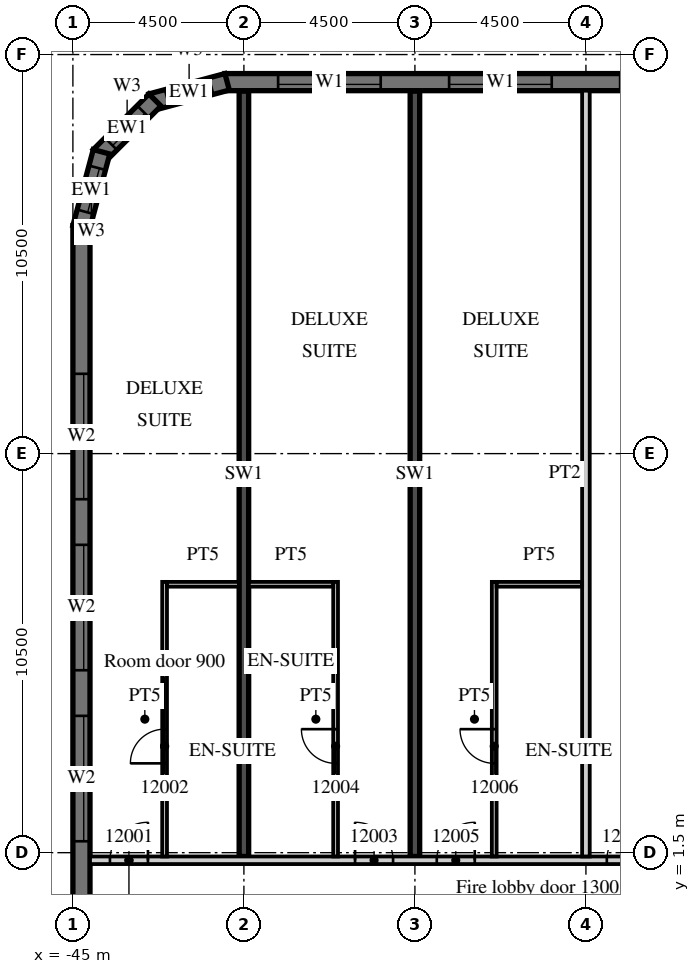
"""IFC4 building model, lengths in metres.
Left out: names, types, materials, properties, quantities, classifications, styles, units other than length and angle.
Written with IfcOpenShell. Run it as: python <this file> out.ifc"""

import sys

from ifc_helpers import new_model, si_unit, direction, frame, frame_2d, origin, place, context, subcontext, project, spatial, polyline, rectangle, outline, extrude, element, fill, save


model = new_model("IFC4")
c1 = context("Model", 3, precision=1e-05, world=origin(), true_north=direction((0.0, 1.0)))
c2 = subcontext(c1, "Body", "Model", "MODEL_VIEW")
j1 = project(units=[si_unit("LENGTHUNIT", "METRE"), si_unit("PLANEANGLEUNIT", "RADIAN")], contexts=[c1])
p1 = place(None, origin())
s1 = spatial("IfcSite", under=j1, at=p1, CompositionType="ELEMENT")
p2 = place(p1, origin())
s2 = spatial("IfcBuilding", under=s1, at=p2, CompositionType="ELEMENT")
p3 = place(p2, frame((0.0, 0.0, 69.9)))
s3 = spatial("IfcBuildingStorey", under=s2, at=p3, CompositionType="ELEMENT", Elevation=69.9)
for number, where, z_axis, x_axis in (
    (1, (-40.5, 1.4, 0.0), (0.0, 0.0, 1.0), (0.0, 1.0, 0.0)),
    (2, (-36.0, 1.4, 0.0), (0.0, 0.0, 1.0), (0.0, 1.0, 0.0)),
):
    element("IfcWall", number, at=place(p3, frame(where, z_axis=z_axis, x_axis=x_axis)), inside=s3, PredefinedType="SHEAR", context=c2, shape_type="SweptSolid", body=[
        extrude(rectangle(XDim=20.14, YDim=0.25, at=frame_2d((10.07, 0.0))), origin(), (0.0, 0.0, 1.0), 3.3),
    ])
p4 = place(p3, frame((13.5, 21.775, 0.0), z_axis=(0.0, 0.0, 1.0), x_axis=(-1.0, 0.0, 0.0)))
e3 = element("IfcWall", 3, at=p4, inside=s3, PredefinedType="SOLIDWALL", context=c2, shape_type="SweptSolid", body=[
    extrude(rectangle(XDim=54.5, YDim=0.45, at=frame_2d((27.25, 0.0))), origin(), (0.0, 0.0, 1.0), 3.02),
])
p5 = place(p4, frame((0.9, 0.0, 0.45)))
e4 = element("IfcOpeningElement", 4, at=p5, cuts=e3, PredefinedType="OPENING", context=c2, shape_type="SweptSolid", body=[
    extrude(rectangle(XDim=2.7, YDim=2.25, at=frame_2d((1.35, 1.125))), frame((0.0, 0.235, 0.0), z_axis=(0.0, -1.0, 0.0), x_axis=(1.0, 0.0, 0.0)), (0.0, 0.0, 1.0), 0.47),
])
p6 = place(p4, frame((5.4, 0.0, 0.45)))
e5 = element("IfcOpeningElement", 5, at=p6, cuts=e3, PredefinedType="OPENING", context=c2, shape_type="SweptSolid", body=[
    extrude(rectangle(XDim=2.7, YDim=2.25, at=frame_2d((1.35, 1.125))), frame((0.0, 0.235, 0.0), z_axis=(0.0, -1.0, 0.0), x_axis=(1.0, 0.0, 0.0)), (0.0, 0.0, 1.0), 0.47),
])
p7 = place(p4, frame((9.9, 0.0, 0.45)))
e6 = element("IfcOpeningElement", 6, at=p7, cuts=e3, PredefinedType="OPENING", context=c2, shape_type="SweptSolid", body=[
    extrude(rectangle(XDim=2.7, YDim=2.25, at=frame_2d((1.35, 1.125))), frame((0.0, 0.235, 0.0), z_axis=(0.0, -1.0, 0.0), x_axis=(1.0, 0.0, 0.0)), (0.0, 0.0, 1.0), 0.47),
])
p8 = place(p4, frame((14.4, 0.0, 0.45)))
e7 = element("IfcOpeningElement", 7, at=p8, cuts=e3, PredefinedType="OPENING", context=c2, shape_type="SweptSolid", body=[
    extrude(rectangle(XDim=2.7, YDim=2.25, at=frame_2d((1.35, 1.125))), frame((0.0, 0.235, 0.0), z_axis=(0.0, -1.0, 0.0), x_axis=(1.0, 0.0, 0.0)), (0.0, 0.0, 1.0), 0.47),
])
p9 = place(p4, frame((18.9, 0.0, 0.45)))
e8 = element("IfcOpeningElement", 8, at=p9, cuts=e3, PredefinedType="OPENING", context=c2, shape_type="SweptSolid", body=[
    extrude(rectangle(XDim=2.7, YDim=2.25, at=frame_2d((1.35, 1.125))), frame((0.0, 0.235, 0.0), z_axis=(0.0, -1.0, 0.0), x_axis=(1.0, 0.0, 0.0)), (0.0, 0.0, 1.0), 0.47),
])
p10 = place(p4, frame((23.4, 0.0, 0.45)))
e9 = element("IfcOpeningElement", 9, at=p10, cuts=e3, PredefinedType="OPENING", context=c2, shape_type="SweptSolid", body=[
    extrude(rectangle(XDim=2.7, YDim=2.25, at=frame_2d((1.35, 1.125))), frame((0.0, 0.235, 0.0), z_axis=(0.0, -1.0, 0.0), x_axis=(1.0, 0.0, 0.0)), (0.0, 0.0, 1.0), 0.47),
])
p11 = place(p4, frame((27.9, 0.0, 0.45)))
e10 = element("IfcOpeningElement", 10, at=p11, cuts=e3, PredefinedType="OPENING", context=c2, shape_type="SweptSolid", body=[
    extrude(rectangle(XDim=2.7, YDim=2.25, at=frame_2d((1.35, 1.125))), frame((0.0, 0.235, 0.0), z_axis=(0.0, -1.0, 0.0), x_axis=(1.0, 0.0, 0.0)), (0.0, 0.0, 1.0), 0.47),
])
p12 = place(p4, frame((32.4, 0.0, 0.45)))
e11 = element("IfcOpeningElement", 11, at=p12, cuts=e3, PredefinedType="OPENING", context=c2, shape_type="SweptSolid", body=[
    extrude(rectangle(XDim=2.7, YDim=2.25, at=frame_2d((1.35, 1.125))), frame((0.0, 0.235, 0.0), z_axis=(0.0, -1.0, 0.0), x_axis=(1.0, 0.0, 0.0)), (0.0, 0.0, 1.0), 0.47),
])
p13 = place(p4, frame((36.9, 0.0, 0.45)))
e12 = element("IfcOpeningElement", 12, at=p13, cuts=e3, PredefinedType="OPENING", context=c2, shape_type="SweptSolid", body=[
    extrude(rectangle(XDim=2.7, YDim=2.25, at=frame_2d((1.35, 1.125))), frame((0.0, 0.235, 0.0), z_axis=(0.0, -1.0, 0.0), x_axis=(1.0, 0.0, 0.0)), (0.0, 0.0, 1.0), 0.47),
])
p14 = place(p4, frame((41.4, 0.0, 0.45)))
e13 = element("IfcOpeningElement", 13, at=p14, cuts=e3, PredefinedType="OPENING", context=c2, shape_type="SweptSolid", body=[
    extrude(rectangle(XDim=2.7, YDim=2.25, at=frame_2d((1.35, 1.125))), frame((0.0, 0.235, 0.0), z_axis=(0.0, -1.0, 0.0), x_axis=(1.0, 0.0, 0.0)), (0.0, 0.0, 1.0), 0.47),
])
p15 = place(p4, frame((45.9, 0.0, 0.45)))
e14 = element("IfcOpeningElement", 14, at=p15, cuts=e3, PredefinedType="OPENING", context=c2, shape_type="SweptSolid", body=[
    extrude(rectangle(XDim=2.7, YDim=2.25, at=frame_2d((1.35, 1.125))), frame((0.0, 0.235, 0.0), z_axis=(0.0, -1.0, 0.0), x_axis=(1.0, 0.0, 0.0)), (0.0, 0.0, 1.0), 0.47),
])
p16 = place(p4, frame((50.4, 0.0, 0.45)))
e15 = element("IfcOpeningElement", 15, at=p16, cuts=e3, PredefinedType="OPENING", context=c2, shape_type="SweptSolid", body=[
    extrude(rectangle(XDim=2.7, YDim=2.25, at=frame_2d((1.35, 1.125))), frame((0.0, 0.235, 0.0), z_axis=(0.0, -1.0, 0.0), x_axis=(1.0, 0.0, 0.0)), (0.0, 0.0, 1.0), 0.47),
])
p17 = place(p3, frame((-40.942, 21.783, 0.0), z_axis=(0.0, 0.0, 1.0), x_axis=(-0.965926999034, -0.25881466832, 0.0)))
e16 = element("IfcWall", 16, at=p17, inside=s3, PredefinedType="SOLIDWALL", context=c2, shape_type="SweptSolid", body=[
    extrude(outline(polyline([(0.0, -0.225), (2.071, -0.225), (1.95, 0.225), (0.121, 0.225), (0.0, -0.225)])), origin(), (0.0, 0.0, 1.0), 3.02),
])
p18 = place(p17, frame((0.435, 0.0, 0.45)))
e17 = element("IfcOpeningElement", 17, at=p18, cuts=e16, PredefinedType="OPENING", context=c2, shape_type="SweptSolid", body=[
    extrude(rectangle(XDim=1.2, YDim=2.25, at=frame_2d((0.6, 1.125))), frame((0.0, 0.235, 0.0), z_axis=(0.0, -1.0, 0.0), x_axis=(1.0, 0.0, 0.0)), (0.0, 0.0, 1.0), 0.47),
])
p19 = place(p3, frame((-42.841, 21.305, 0.0), z_axis=(0.0, 0.0, 1.0), x_axis=(-0.707106781187, -0.707106781187, 0.0)))
e18 = element("IfcWall", 18, at=p19, inside=s3, PredefinedType="SOLIDWALL", context=c2, shape_type="SweptSolid", body=[
    extrude(outline(polyline([(0.0, -0.225), (2.071, -0.225), (1.95, 0.225), (0.121, 0.225), (0.0, -0.225)])), origin(), (0.0, 0.0, 1.0), 3.02),
])
p20 = place(p19, frame((0.435, 0.0, 0.45)))
e19 = element("IfcOpeningElement", 19, at=p20, cuts=e18, PredefinedType="OPENING", context=c2, shape_type="SweptSolid", body=[
    extrude(rectangle(XDim=1.2, YDim=2.25, at=frame_2d((0.6, 1.125))), frame((0.0, 0.235, 0.0), z_axis=(0.0, -1.0, 0.0), x_axis=(1.0, 0.0, 0.0)), (0.0, 0.0, 1.0), 0.47),
])
p21 = place(p3, frame((-44.247, 19.942, 0.0), z_axis=(0.0, 0.0, 1.0), x_axis=(-0.25881466832, -0.965926999034, 0.0)))
e20 = element("IfcWall", 20, at=p21, inside=s3, PredefinedType="SOLIDWALL", context=c2, shape_type="SweptSolid", body=[
    extrude(outline(polyline([(-0.0, -0.225), (2.07, -0.225), (1.95, 0.225), (0.12, 0.225), (-0.0, -0.225)])), origin(), (0.0, 0.0, 1.0), 3.02),
])
p22 = place(p21, frame((0.435, 0.0, 0.45)))
e21 = element("IfcOpeningElement", 21, at=p22, cuts=e20, PredefinedType="OPENING", context=c2, shape_type="SweptSolid", body=[
    extrude(rectangle(XDim=1.2, YDim=2.25, at=frame_2d((0.6, 1.125))), frame((0.0, 0.235, 0.0), z_axis=(0.0, -1.0, 0.0), x_axis=(1.0, 0.0, 0.0)), (0.0, 0.0, 1.0), 0.47),
])
p23 = place(p3, frame((-44.775, 18.0, 0.0), z_axis=(0.0, 0.0, 1.0), x_axis=(0.0, -1.0, 0.0)))
e22 = element("IfcWall", 22, at=p23, inside=s3, PredefinedType="SOLIDWALL", context=c2, shape_type="SweptSolid", body=[
    extrude(rectangle(XDim=36.0, YDim=0.45, at=frame_2d((18.0, 0.0))), origin(), (0.0, 0.0, 1.0), 3.02),
])
p24 = place(p23, frame((3.9, 0.0, 0.45)))
e23 = element("IfcOpeningElement", 23, at=p24, cuts=e22, PredefinedType="OPENING", context=c2, shape_type="SweptSolid", body=[
    extrude(rectangle(XDim=3.3, YDim=2.25, at=frame_2d((1.65, 1.125))), frame((0.0, 0.235, 0.0), z_axis=(0.0, -1.0, 0.0), x_axis=(1.0, 0.0, 0.0)), (0.0, 0.0, 1.0), 0.47),
])
p25 = place(p23, frame((8.4, 0.0, 0.45)))
e24 = element("IfcOpeningElement", 24, at=p25, cuts=e22, PredefinedType="OPENING", context=c2, shape_type="SweptSolid", body=[
    extrude(rectangle(XDim=3.3, YDim=2.25, at=frame_2d((1.65, 1.125))), frame((0.0, 0.235, 0.0), z_axis=(0.0, -1.0, 0.0), x_axis=(1.0, 0.0, 0.0)), (0.0, 0.0, 1.0), 0.47),
])
p26 = place(p23, frame((12.9, 0.0, 0.45)))
e25 = element("IfcOpeningElement", 25, at=p26, cuts=e22, PredefinedType="OPENING", context=c2, shape_type="SweptSolid", body=[
    extrude(rectangle(XDim=3.3, YDim=2.25, at=frame_2d((1.65, 1.125))), frame((0.0, 0.235, 0.0), z_axis=(0.0, -1.0, 0.0), x_axis=(1.0, 0.0, 0.0)), (0.0, 0.0, 1.0), 0.47),
])
p27 = place(p3, frame((-44.55, 1.3, 0.0), z_axis=(0.0, 0.0, 1.0), x_axis=(1.0, 0.0, 0.0)))
e26 = element("IfcWall", 26, at=p27, inside=s3, PredefinedType="PARTITIONING", context=c2, shape_type="SweptSolid", body=[
    extrude(rectangle(XDim=58.05, YDim=0.2, at=frame_2d((29.025, 0.0))), origin(), (0.0, 0.0, 1.0), 3.02),
])
p28 = place(p27, frame((0.525, 0.0, 0.0)))
e27 = element("IfcOpeningElement", 27, at=p28, cuts=e26, PredefinedType="OPENING", context=c2, shape_type="SweptSolid", body=[
    extrude(rectangle(XDim=1.0, YDim=2.1, at=frame_2d((0.5, 1.05))), frame((0.0, 0.11, 0.0), z_axis=(0.0, -1.0, 0.0), x_axis=(1.0, 0.0, 0.0)), (0.0, 0.0, 1.0), 0.22),
])
p29 = place(p27, frame((6.975, 0.0, 0.0)))
e28 = element("IfcOpeningElement", 28, at=p29, cuts=e26, PredefinedType="OPENING", context=c2, shape_type="SweptSolid", body=[
    extrude(rectangle(XDim=1.0, YDim=2.1, at=frame_2d((0.5, 1.05))), frame((0.0, 0.11, 0.0), z_axis=(0.0, -1.0, 0.0), x_axis=(1.0, 0.0, 0.0)), (0.0, 0.0, 1.0), 0.22),
])
p30 = place(p27, frame((9.125, 0.0, 0.0)))
e29 = element("IfcOpeningElement", 29, at=p30, cuts=e26, PredefinedType="OPENING", context=c2, shape_type="SweptSolid", body=[
    extrude(rectangle(XDim=1.0, YDim=2.1, at=frame_2d((0.5, 1.05))), frame((0.0, 0.11, 0.0), z_axis=(0.0, -1.0, 0.0), x_axis=(1.0, 0.0, 0.0)), (0.0, 0.0, 1.0), 0.22),
])
p31 = place(p27, frame((13.6, 0.0, 0.0)))
e30 = element("IfcOpeningElement", 30, at=p31, cuts=e26, PredefinedType="OPENING", context=c2, shape_type="SweptSolid", body=[
    extrude(rectangle(XDim=1.0, YDim=2.1, at=frame_2d((0.5, 1.05))), frame((0.0, 0.11, 0.0), z_axis=(0.0, -1.0, 0.0), x_axis=(1.0, 0.0, 0.0)), (0.0, 0.0, 1.0), 0.22),
])
p32 = place(p27, frame((19.987, 0.0, 0.0)))
e31 = element("IfcOpeningElement", 31, at=p32, cuts=e26, PredefinedType="OPENING", context=c2, shape_type="SweptSolid", body=[
    extrude(rectangle(XDim=1.2, YDim=2.1, at=frame_2d((0.6, 1.05))), frame((0.0, 0.11, 0.0), z_axis=(0.0, -1.0, 0.0), x_axis=(1.0, 0.0, 0.0)), (0.0, 0.0, 1.0), 0.22),
])
p33 = place(p27, frame((31.912, 0.0, 0.0)))
e32 = element("IfcOpeningElement", 32, at=p33, cuts=e26, PredefinedType="OPENING", context=c2, shape_type="SweptSolid", body=[
    extrude(rectangle(XDim=1.2, YDim=2.1, at=frame_2d((0.6, 1.05))), frame((0.0, 0.11, 0.0), z_axis=(0.0, -1.0, 0.0), x_axis=(1.0, 0.0, 0.0)), (0.0, 0.0, 1.0), 0.22),
])
p34 = place(p27, frame((38.5, 0.0, 0.0)))
e33 = element("IfcOpeningElement", 33, at=p34, cuts=e26, PredefinedType="OPENING", context=c2, shape_type="SweptSolid", body=[
    extrude(rectangle(XDim=1.0, YDim=2.1, at=frame_2d((0.5, 1.05))), frame((0.0, 0.11, 0.0), z_axis=(0.0, -1.0, 0.0), x_axis=(1.0, 0.0, 0.0)), (0.0, 0.0, 1.0), 0.22),
])
p35 = place(p27, frame((40.6, 0.0, 0.0)))
e34 = element("IfcOpeningElement", 34, at=p35, cuts=e26, PredefinedType="OPENING", context=c2, shape_type="SweptSolid", body=[
    extrude(rectangle(XDim=1.0, YDim=2.1, at=frame_2d((0.5, 1.05))), frame((0.0, 0.11, 0.0), z_axis=(0.0, -1.0, 0.0), x_axis=(1.0, 0.0, 0.0)), (0.0, 0.0, 1.0), 0.22),
])
p36 = place(p27, frame((47.5, 0.0, 0.0)))
e35 = element("IfcOpeningElement", 35, at=p36, cuts=e26, PredefinedType="OPENING", context=c2, shape_type="SweptSolid", body=[
    extrude(rectangle(XDim=1.0, YDim=2.1, at=frame_2d((0.5, 1.05))), frame((0.0, 0.11, 0.0), z_axis=(0.0, -1.0, 0.0), x_axis=(1.0, 0.0, 0.0)), (0.0, 0.0, 1.0), 0.22),
])
p37 = place(p27, frame((51.975, 0.0, 0.0)))
e36 = element("IfcOpeningElement", 36, at=p37, cuts=e26, PredefinedType="OPENING", context=c2, shape_type="SweptSolid", body=[
    extrude(rectangle(XDim=1.0, YDim=2.1, at=frame_2d((0.5, 1.05))), frame((0.0, 0.11, 0.0), z_axis=(0.0, -1.0, 0.0), x_axis=(1.0, 0.0, 0.0)), (0.0, 0.0, 1.0), 0.22),
])
p38 = place(p27, frame((56.475, 0.0, 0.0)))
e37 = element("IfcOpeningElement", 37, at=p38, cuts=e26, PredefinedType="OPENING", context=c2, shape_type="SweptSolid", body=[
    extrude(rectangle(XDim=1.0, YDim=2.1, at=frame_2d((0.5, 1.05))), frame((0.0, 0.11, 0.0), z_axis=(0.0, -1.0, 0.0), x_axis=(1.0, 0.0, 0.0)), (0.0, 0.0, 1.0), 0.22),
])
p39 = place(p3, frame((-42.587, 1.4, 0.0), z_axis=(0.0, 0.0, 1.0), x_axis=(0.0, 1.0, 0.0)))
e38 = element("IfcWall", 38, at=p39, inside=s3, PredefinedType="PARTITIONING", context=c2, shape_type="SweptSolid", body=[
    extrude(rectangle(XDim=7.225, YDim=0.125, at=frame_2d((3.613, 0.0))), origin(), (0.0, 0.0, 1.0), 3.02),
])
p40 = place(p39, frame((2.45, 0.0, 0.0)))
e39 = element("IfcOpeningElement", 39, at=p40, cuts=e38, PredefinedType="OPENING", context=c2, shape_type="SweptSolid", body=[
    extrude(rectangle(XDim=0.9, YDim=2.1, at=frame_2d((0.45, 1.05))), frame((0.0, 0.073, 0.0), z_axis=(0.0, -1.0, 0.0), x_axis=(1.0, 0.0, 0.0)), (0.0, 0.0, 1.0), 0.145),
])
p41 = place(p3, frame((-42.525, 8.562, 0.0), z_axis=(0.0, 0.0, 1.0), x_axis=(1.0, 0.0, 0.0)))
e40 = element("IfcWall", 40, at=p41, inside=s3, PredefinedType="PARTITIONING", context=c2, shape_type="SweptSolid", body=[
    extrude(rectangle(XDim=1.9, YDim=0.125, at=frame_2d((0.95, 0.0))), origin(), (0.0, 0.0, 1.0), 3.02),
])
p42 = place(p3, frame((-38.087, 1.4, 0.0), z_axis=(0.0, 0.0, 1.0), x_axis=(0.0, 1.0, 0.0)))
e41 = element("IfcWall", 41, at=p42, inside=s3, PredefinedType="PARTITIONING", context=c2, shape_type="SweptSolid", body=[
    extrude(rectangle(XDim=7.225, YDim=0.125, at=frame_2d((3.613, 0.0))), origin(), (0.0, 0.0, 1.0), 3.02),
])
p43 = place(p42, frame((2.45, 0.0, 0.0)))
e42 = element("IfcOpeningElement", 42, at=p43, cuts=e41, PredefinedType="OPENING", context=c2, shape_type="SweptSolid", body=[
    extrude(rectangle(XDim=0.9, YDim=2.1, at=frame_2d((0.45, 1.05))), frame((0.0, 0.073, 0.0), z_axis=(0.0, -1.0, 0.0), x_axis=(1.0, 0.0, 0.0)), (0.0, 0.0, 1.0), 0.145),
])
p44 = place(p3, frame((-40.375, 8.562, 0.0), z_axis=(0.0, 0.0, 1.0), x_axis=(1.0, 0.0, 0.0)))
e43 = element("IfcWall", 43, at=p44, inside=s3, PredefinedType="PARTITIONING", context=c2, shape_type="SweptSolid", body=[
    extrude(rectangle(XDim=2.225, YDim=0.125, at=frame_2d((1.113, 0.0))), origin(), (0.0, 0.0, 1.0), 3.02),
])
p45 = place(p3, frame((-31.5, 1.4, 0.0), z_axis=(0.0, 0.0, 1.0), x_axis=(0.0, 1.0, 0.0)))
e44 = element("IfcWall", 44, at=p45, inside=s3, PredefinedType="PARTITIONING", context=c2, shape_type="SweptSolid", body=[
    extrude(rectangle(XDim=20.15, YDim=0.2, at=frame_2d((10.075, 0.0))), origin(), (0.0, 0.0, 1.0), 3.02),
])
p46 = place(p3, frame((-33.913, 1.4, 0.0), z_axis=(0.0, 0.0, 1.0), x_axis=(0.0, 1.0, 0.0)))
e45 = element("IfcWall", 45, at=p46, inside=s3, PredefinedType="PARTITIONING", context=c2, shape_type="SweptSolid", body=[
    extrude(rectangle(XDim=7.225, YDim=0.125, at=frame_2d((3.613, 0.0))), origin(), (0.0, 0.0, 1.0), 3.02),
])
p47 = place(p46, frame((2.45, 0.0, 0.0)))
e46 = element("IfcOpeningElement", 46, at=p47, cuts=e45, PredefinedType="OPENING", context=c2, shape_type="SweptSolid", body=[
    extrude(rectangle(XDim=0.9, YDim=2.1, at=frame_2d((0.45, 1.05))), frame((0.0, 0.073, 0.0), z_axis=(0.0, -1.0, 0.0), x_axis=(1.0, 0.0, 0.0)), (0.0, 0.0, 1.0), 0.145),
])
p48 = place(p3, frame((-33.85, 8.562, 0.0), z_axis=(0.0, 0.0, 1.0), x_axis=(1.0, 0.0, 0.0)))
e47 = element("IfcWall", 47, at=p48, inside=s3, PredefinedType="PARTITIONING", context=c2, shape_type="SweptSolid", body=[
    extrude(rectangle(XDim=2.25, YDim=0.125, at=frame_2d((1.125, 0.0))), origin(), (0.0, 0.0, 1.0), 3.02),
])
p49 = place(p15, origin())
e48 = element("IfcWindow", 48, at=p49, inside=s3, PartitioningType="SINGLE_PANEL", PredefinedType="WINDOW", context=c2, shape_type="SweptSolid", body=[
    extrude(rectangle(XDim=2.7, YDim=2.25, at=frame_2d((1.35, 1.125))), frame((0.0, 0.09, 0.0), z_axis=(0.0, -1.0, 0.0), x_axis=(1.0, 0.0, 0.0)), (0.0, 0.0, 1.0), 0.06),
])
fill(e14, e48)
p50 = place(p16, origin())
e49 = element("IfcWindow", 49, at=p50, inside=s3, PartitioningType="SINGLE_PANEL", PredefinedType="WINDOW", context=c2, shape_type="SweptSolid", body=[
    extrude(rectangle(XDim=2.7, YDim=2.25, at=frame_2d((1.35, 1.125))), frame((0.0, 0.09, 0.0), z_axis=(0.0, -1.0, 0.0), x_axis=(1.0, 0.0, 0.0)), (0.0, 0.0, 1.0), 0.06),
])
fill(e15, e49)
p51 = place(p18, origin())
e50 = element("IfcWindow", 50, at=p51, inside=s3, PartitioningType="SINGLE_PANEL", PredefinedType="WINDOW", context=c2, shape_type="SweptSolid", body=[
    extrude(rectangle(XDim=1.2, YDim=2.25, at=frame_2d((0.6, 1.125))), frame((0.0, 0.09, 0.0), z_axis=(0.0, -1.0, 0.0), x_axis=(1.0, 0.0, 0.0)), (0.0, 0.0, 1.0), 0.06),
])
fill(e17, e50)
p52 = place(p20, origin())
e51 = element("IfcWindow", 51, at=p52, inside=s3, PartitioningType="SINGLE_PANEL", PredefinedType="WINDOW", context=c2, shape_type="SweptSolid", body=[
    extrude(rectangle(XDim=1.2, YDim=2.25, at=frame_2d((0.6, 1.125))), frame((0.0, 0.09, 0.0), z_axis=(0.0, -1.0, 0.0), x_axis=(1.0, 0.0, 0.0)), (0.0, 0.0, 1.0), 0.06),
])
fill(e19, e51)
p53 = place(p22, origin())
e52 = element("IfcWindow", 52, at=p53, inside=s3, PartitioningType="SINGLE_PANEL", PredefinedType="WINDOW", context=c2, shape_type="SweptSolid", body=[
    extrude(rectangle(XDim=1.2, YDim=2.25, at=frame_2d((0.6, 1.125))), frame((0.0, 0.09, 0.0), z_axis=(0.0, -1.0, 0.0), x_axis=(1.0, 0.0, 0.0)), (0.0, 0.0, 1.0), 0.06),
])
fill(e21, e52)
p54 = place(p24, origin())
e53 = element("IfcWindow", 53, at=p54, inside=s3, PartitioningType="SINGLE_PANEL", PredefinedType="WINDOW", context=c2, shape_type="SweptSolid", body=[
    extrude(rectangle(XDim=3.3, YDim=2.25, at=frame_2d((1.65, 1.125))), frame((0.0, 0.09, 0.0), z_axis=(0.0, -1.0, 0.0), x_axis=(1.0, 0.0, 0.0)), (0.0, 0.0, 1.0), 0.06),
])
fill(e23, e53)
p55 = place(p25, origin())
e54 = element("IfcWindow", 54, at=p55, inside=s3, PartitioningType="SINGLE_PANEL", PredefinedType="WINDOW", context=c2, shape_type="SweptSolid", body=[
    extrude(rectangle(XDim=3.3, YDim=2.25, at=frame_2d((1.65, 1.125))), frame((0.0, 0.09, 0.0), z_axis=(0.0, -1.0, 0.0), x_axis=(1.0, 0.0, 0.0)), (0.0, 0.0, 1.0), 0.06),
])
fill(e24, e54)
p56 = place(p26, origin())
e55 = element("IfcWindow", 55, at=p56, inside=s3, PartitioningType="SINGLE_PANEL", PredefinedType="WINDOW", context=c2, shape_type="SweptSolid", body=[
    extrude(rectangle(XDim=3.3, YDim=2.25, at=frame_2d((1.65, 1.125))), frame((0.0, 0.09, 0.0), z_axis=(0.0, -1.0, 0.0), x_axis=(1.0, 0.0, 0.0)), (0.0, 0.0, 1.0), 0.06),
])
fill(e25, e55)
p57 = place(p28, origin())
e56 = element("IfcDoor", 56, at=p57, inside=s3, OperationType="SINGLE_SWING_RIGHT", PredefinedType="DOOR", context=c2, shape_type="SweptSolid", body=[
    extrude(rectangle(XDim=1.0, YDim=2.1, at=frame_2d((0.5, 1.05))), frame((0.0, 0.025, 0.0), z_axis=(0.0, -1.0, 0.0), x_axis=(1.0, 0.0, 0.0)), (0.0, 0.0, 1.0), 0.05),
])
fill(e27, e56)
p58 = place(p40, origin())
e57 = element("IfcDoor", 57, at=p58, inside=s3, OperationType="SINGLE_SWING_LEFT", PredefinedType="DOOR", context=c2, shape_type="SweptSolid", body=[
    extrude(rectangle(XDim=0.9, YDim=2.1, at=frame_2d((0.45, 1.05))), frame((0.0, 0.025, 0.0), z_axis=(0.0, -1.0, 0.0), x_axis=(1.0, 0.0, 0.0)), (0.0, 0.0, 1.0), 0.05),
])
fill(e39, e57)
p59 = place(p29, origin())
e58 = element("IfcDoor", 58, at=p59, inside=s3, OperationType="SINGLE_SWING_LEFT", PredefinedType="DOOR", context=c2, shape_type="SweptSolid", body=[
    extrude(rectangle(XDim=1.0, YDim=2.1, at=frame_2d((0.5, 1.05))), frame((0.0, 0.025, 0.0), z_axis=(0.0, -1.0, 0.0), x_axis=(1.0, 0.0, 0.0)), (0.0, 0.0, 1.0), 0.05),
])
fill(e28, e58)
p60 = place(p43, origin())
e59 = element("IfcDoor", 59, at=p60, inside=s3, OperationType="SINGLE_SWING_RIGHT", PredefinedType="DOOR", context=c2, shape_type="SweptSolid", body=[
    extrude(rectangle(XDim=0.9, YDim=2.1, at=frame_2d((0.45, 1.05))), frame((0.0, 0.025, 0.0), z_axis=(0.0, -1.0, 0.0), x_axis=(1.0, 0.0, 0.0)), (0.0, 0.0, 1.0), 0.05),
])
fill(e42, e59)
p61 = place(p30, origin())
e60 = element("IfcDoor", 60, at=p61, inside=s3, OperationType="SINGLE_SWING_RIGHT", PredefinedType="DOOR", context=c2, shape_type="SweptSolid", body=[
    extrude(rectangle(XDim=1.0, YDim=2.1, at=frame_2d((0.5, 1.05))), frame((0.0, 0.025, 0.0), z_axis=(0.0, -1.0, 0.0), x_axis=(1.0, 0.0, 0.0)), (0.0, 0.0, 1.0), 0.05),
])
fill(e29, e60)
p62 = place(p47, origin())
e61 = element("IfcDoor", 61, at=p62, inside=s3, OperationType="SINGLE_SWING_RIGHT", PredefinedType="DOOR", context=c2, shape_type="SweptSolid", body=[
    extrude(rectangle(XDim=0.9, YDim=2.1, at=frame_2d((0.45, 1.05))), frame((0.0, 0.025, 0.0), z_axis=(0.0, -1.0, 0.0), x_axis=(1.0, 0.0, 0.0)), (0.0, 0.0, 1.0), 0.05),
])
fill(e46, e61)
p63 = place(p31, origin())
e62 = element("IfcDoor", 62, at=p63, inside=s3, OperationType="SINGLE_SWING_RIGHT", PredefinedType="DOOR", context=c2, shape_type="SweptSolid", body=[
    extrude(rectangle(XDim=1.0, YDim=2.1, at=frame_2d((0.5, 1.05))), frame((0.0, 0.025, 0.0), z_axis=(0.0, -1.0, 0.0), x_axis=(1.0, 0.0, 0.0)), (0.0, 0.0, 1.0), 0.05),
])
fill(e30, e62)
save(model, sys.argv[1])
